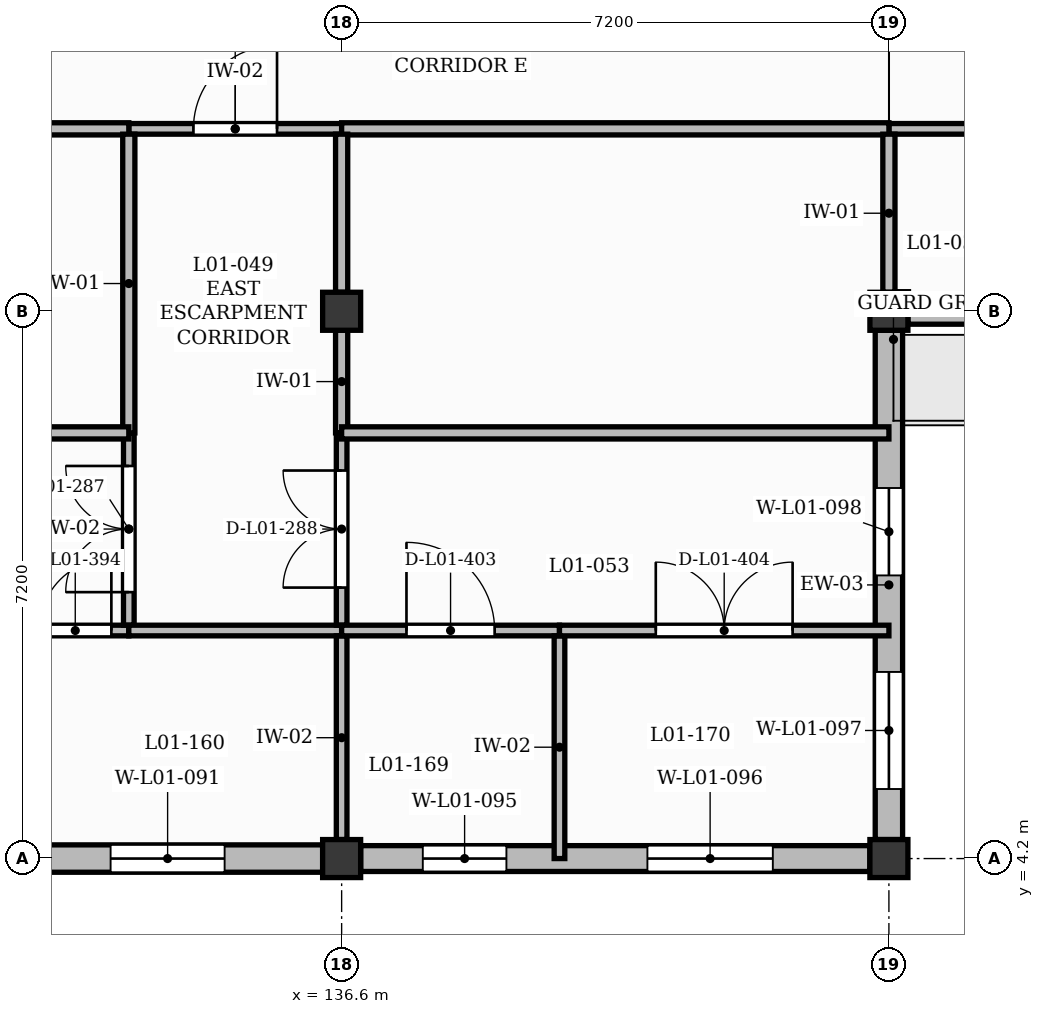
"""IFC4 building model, lengths in metres.
Left out: names, types, materials, properties, quantities, classifications, styles, units other than length and angle.
Written with IfcOpenShell. Run it as: python <this file> out.ifc"""

import sys

from ifc_helpers import new_model, si_unit, direction, frame, frame_2d, origin, origin_2d, place, context, subcontext, project, spatial, rectangle, extrude, element, fill, save


model = new_model("IFC4")
c1 = context("Model", 3, precision=1e-05, world=origin(), true_north=direction((0.0, 1.0)))
c2 = subcontext(c1, "Body", "Model", "MODEL_VIEW")
j1 = project(units=[si_unit("LENGTHUNIT", "METRE"), si_unit("PLANEANGLEUNIT", "RADIAN")], contexts=[c1])
p1 = place(None, origin())
s1 = spatial("IfcSite", under=j1, at=p1, CompositionType="ELEMENT")
p2 = place(p1, origin())
s2 = spatial("IfcBuilding", under=s1, at=p2, CompositionType="ELEMENT")
p3 = place(p2, frame((0.0, 0.0, 4.5)))
s3 = spatial("IfcBuildingStorey", under=s2, at=p3, CompositionType="ELEMENT", Elevation=4.5)
for number, where, z_axis, x_axis in (
    (1, (136.6, 4.2, 0.0), (0.0, 0.0, 1.0), (1.0, 0.0, 0.0)),
    (2, (136.6, 11.4, 0.0), (0.0, 0.0, 1.0), (1.0, 0.0, 0.0)),
    (3, (143.8, 4.2, 0.0), (0.0, 0.0, 1.0), (1.0, 0.0, 0.0)),
    (4, (143.8, 11.4, 0.0), (0.0, 0.0, 1.0), (1.0, 0.0, 0.0)),
):
    element("IfcColumn", number, at=place(p3, frame(where, z_axis=z_axis, x_axis=x_axis)), inside=s3, PredefinedType="COLUMN", context=c2, shape_type="SweptSolid", body=[
        extrude(rectangle(XDim=0.5, YDim=0.5, at=origin_2d()), origin(), (0.0, 0.0, 1.0), 4.22),
    ])
p4 = place(p3, frame((130.45, 4.2, 0.0), z_axis=(0.0, 0.0, 1.0), x_axis=(1.0, 0.0, 0.0)))
e5 = element("IfcWall", 5, at=p4, inside=s3, PredefinedType="SOLIDWALL", context=c2, shape_type="SweptSolid", body=[
    extrude(rectangle(XDim=5.9, YDim=0.36, at=frame_2d((2.95, 0.0))), origin(), (0.0, 0.0, 1.0), 3.52),
])
p5 = place(p4, frame((3.111, 0.0, 1.5)))
e6 = element("IfcOpeningElement", 6, at=p5, cuts=e5, PredefinedType="OPENING", context=c2, shape_type="SweptSolid", body=[
    extrude(rectangle(XDim=1.5, YDim=1.25, at=frame_2d((0.75, 0.625))), frame((0.0, 0.19, 0.0), z_axis=(0.0, -1.0, 0.0), x_axis=(1.0, 0.0, 0.0)), (0.0, 0.0, 1.0), 0.38),
])
p6 = place(p3, frame((136.85, 4.2, 0.0), z_axis=(0.0, 0.0, 1.0), x_axis=(1.0, 0.0, 0.0)))
e7 = element("IfcWall", 7, at=p6, inside=s3, PredefinedType="SOLIDWALL", context=c2, shape_type="SweptSolid", body=[
    extrude(rectangle(XDim=6.7, YDim=0.34, at=frame_2d((3.35, 0.0))), origin(), (0.0, 0.0, 1.0), 3.52),
])
p7 = place(p6, frame((0.818, 0.0, 1.0)))
e8 = element("IfcOpeningElement", 8, at=p7, cuts=e7, PredefinedType="OPENING", context=c2, shape_type="SweptSolid", body=[
    extrude(rectangle(XDim=1.1, YDim=1.8, at=frame_2d((0.55, 0.9))), frame((0.0, 0.18, 0.0), z_axis=(0.0, -1.0, 0.0), x_axis=(1.0, 0.0, 0.0)), (0.0, 0.0, 1.0), 0.36),
])
p8 = place(p6, frame((3.773, 0.0, 1.35)))
e9 = element("IfcOpeningElement", 9, at=p8, cuts=e7, PredefinedType="OPENING", context=c2, shape_type="SweptSolid", body=[
    extrude(rectangle(XDim=1.65, YDim=1.4, at=frame_2d((0.825, 0.7))), frame((0.0, 0.18, 0.0), z_axis=(0.0, -1.0, 0.0), x_axis=(1.0, 0.0, 0.0)), (0.0, 0.0, 1.0), 0.36),
])
p9 = place(p3, frame((143.8, 4.45, 0.0), z_axis=(0.0, 0.0, 1.0), x_axis=(0.0, 1.0, 0.0)))
e10 = element("IfcWall", 10, at=p9, inside=s3, PredefinedType="SOLIDWALL", context=c2, shape_type="SweptSolid", body=[
    extrude(rectangle(XDim=6.7, YDim=0.36, at=frame_2d((3.35, 0.0))), origin(), (0.0, 0.0, 1.0), 3.52),
])
p10 = place(p9, frame((0.665, 0.0, 1.05)))
e11 = element("IfcOpeningElement", 11, at=p10, cuts=e10, PredefinedType="OPENING", context=c2, shape_type="SweptSolid", body=[
    extrude(rectangle(XDim=1.54, YDim=1.65, at=frame_2d((0.77, 0.825))), frame((0.0, 0.19, 0.0), z_axis=(0.0, -1.0, 0.0), x_axis=(1.0, 0.0, 0.0)), (0.0, 0.0, 1.0), 0.38),
])
p11 = place(p9, frame((3.475, 0.0, 1.5)))
e12 = element("IfcOpeningElement", 12, at=p11, cuts=e10, PredefinedType="OPENING", context=c2, shape_type="SweptSolid", body=[
    extrude(rectangle(XDim=1.15, YDim=1.25, at=frame_2d((0.575, 0.625))), frame((0.0, 0.19, 0.0), z_axis=(0.0, -1.0, 0.0), x_axis=(1.0, 0.0, 0.0)), (0.0, 0.0, 1.0), 0.38),
])
p12 = place(p3, frame((144.05, 11.4, 0.0), z_axis=(0.0, 0.0, 1.0), x_axis=(1.0, 0.0, 0.0)))
e13 = element("IfcWall", 13, at=p12, inside=s3, PredefinedType="SOLIDWALL", context=c2, shape_type="SweptSolid", body=[
    extrude(rectangle(XDim=6.77, YDim=0.34, at=frame_2d((3.385, 0.0))), origin(), (0.0, 0.0, 1.0), 3.76),
])
p13 = place(p12, frame((1.75, 0.0, 0.0)))
e14 = element("IfcOpeningElement", 14, at=p13, cuts=e13, PredefinedType="OPENING", context=c2, shape_type="SweptSolid", body=[
    extrude(rectangle(XDim=1.18, YDim=2.2, at=frame_2d((0.59, 1.1))), frame((0.0, 0.18, 0.0), z_axis=(0.0, -1.0, 0.0), x_axis=(1.0, 0.0, 0.0)), (0.0, 0.0, 1.0), 0.36),
])
p14 = place(p12, frame((4.4, 0.0, 1.05)))
e15 = element("IfcOpeningElement", 15, at=p14, cuts=e13, PredefinedType="OPENING", context=c2, shape_type="SweptSolid", body=[
    extrude(rectangle(XDim=1.4, YDim=1.65, at=frame_2d((0.7, 0.825))), frame((0.0, 0.18, 0.0), z_axis=(0.0, -1.0, 0.0), x_axis=(1.0, 0.0, 0.0)), (0.0, 0.0, 1.0), 0.36),
])
p15 = place(p3, frame((132.391, 7.2, 0.0), z_axis=(0.0, 0.0, 1.0), x_axis=(1.0, 0.0, 0.0)))
e16 = element("IfcWall", 16, at=p15, inside=s3, PredefinedType="PARTITIONING", context=c2, shape_type="SweptSolid", body=[
    extrude(rectangle(XDim=1.409, YDim=0.14, at=frame_2d((0.705, 0.0))), origin(), (0.0, 0.0, 1.0), 4.18),
])
p16 = place(p15, frame((0.229, 0.0, 0.0)))
e17 = element("IfcOpeningElement", 17, at=p16, cuts=e16, PredefinedType="OPENING", context=c2, shape_type="SweptSolid", body=[
    extrude(rectangle(XDim=0.95, YDim=2.1, at=frame_2d((0.475, 1.05))), frame((0.0, 0.08, 0.0), z_axis=(0.0, -1.0, 0.0), x_axis=(1.0, 0.0, 0.0)), (0.0, 0.0, 1.0), 0.16),
])
p17 = place(p3, frame((133.8, 7.27, 0.0), z_axis=(0.0, 0.0, 1.0), x_axis=(0.0, 1.0, 0.0)))
e18 = element("IfcWall", 18, at=p17, inside=s3, PredefinedType="PARTITIONING", context=c2, shape_type="SweptSolid", body=[
    extrude(rectangle(XDim=2.53, YDim=0.14, at=frame_2d((1.265, 0.0))), origin(), (0.0, 0.0, 1.0), 4.18),
])
p18 = place(p17, frame((0.435, 0.0, 0.0)))
e19 = element("IfcOpeningElement", 19, at=p18, cuts=e18, PredefinedType="OPENING", context=c2, shape_type="SweptSolid", body=[
    extrude(rectangle(XDim=1.66, YDim=2.3, at=frame_2d((0.83, 1.15))), frame((0.0, 0.08, 0.0), z_axis=(0.0, -1.0, 0.0), x_axis=(1.0, 0.0, 0.0)), (0.0, 0.0, 1.0), 0.16),
])
p19 = place(p3, frame((133.8, 7.2, 0.0), z_axis=(0.0, 0.0, 1.0), x_axis=(1.0, 0.0, 0.0)))
e20 = element("IfcWall", 20, at=p19, inside=s3, PredefinedType="PARTITIONING", context=c2, shape_type="SweptSolid", body=[
    extrude(rectangle(XDim=2.8, YDim=0.14, at=frame_2d((1.4, 0.0))), origin(), (0.0, 0.0, 1.0), 4.18),
])
p20 = place(p3, frame((133.8, 13.8, 0.0), z_axis=(0.0, 0.0, 1.0), x_axis=(1.0, 0.0, 0.0)))
e21 = element("IfcWall", 21, at=p20, inside=s3, PredefinedType="PARTITIONING", context=c2, shape_type="SweptSolid", body=[
    extrude(rectangle(XDim=2.8, YDim=0.14, at=frame_2d((1.4, 0.0))), origin(), (0.0, 0.0, 1.0), 4.18),
])
p21 = place(p20, frame((0.85, 0.0, 0.0)))
e22 = element("IfcOpeningElement", 22, at=p21, cuts=e21, PredefinedType="OPENING", context=c2, shape_type="SweptSolid", body=[
    extrude(rectangle(XDim=1.1, YDim=2.1, at=frame_2d((0.55, 1.05))), frame((0.0, 0.08, 0.0), z_axis=(0.0, -1.0, 0.0), x_axis=(1.0, 0.0, 0.0)), (0.0, 0.0, 1.0), 0.16),
])
p22 = place(p3, frame((136.6, 4.45, 0.0), z_axis=(0.0, 0.0, 1.0), x_axis=(0.0, 1.0, 0.0)))
e23 = element("IfcWall", 23, at=p22, inside=s3, PredefinedType="PARTITIONING", context=c2, shape_type="SweptSolid", body=[
    extrude(rectangle(XDim=2.68, YDim=0.14, at=frame_2d((1.34, 0.0))), origin(), (0.0, 0.0, 1.0), 3.52),
])
p23 = place(p3, frame((136.6, 7.27, 0.0), z_axis=(0.0, 0.0, 1.0), x_axis=(0.0, 1.0, 0.0)))
e24 = element("IfcWall", 24, at=p23, inside=s3, PredefinedType="PARTITIONING", context=c2, shape_type="SweptSolid", body=[
    extrude(rectangle(XDim=2.53, YDim=0.14, at=frame_2d((1.265, 0.0))), origin(), (0.0, 0.0, 1.0), 3.52),
])
p24 = place(p23, frame((0.495, 0.0, 0.0)))
e25 = element("IfcOpeningElement", 25, at=p24, cuts=e24, PredefinedType="OPENING", context=c2, shape_type="SweptSolid", body=[
    extrude(rectangle(XDim=1.54, YDim=2.25, at=frame_2d((0.77, 1.125))), frame((0.0, 0.08, 0.0), z_axis=(0.0, -1.0, 0.0), x_axis=(1.0, 0.0, 0.0)), (0.0, 0.0, 1.0), 0.16),
])
p25 = place(p3, frame((136.6, 7.2, 0.0), z_axis=(0.0, 0.0, 1.0), x_axis=(1.0, 0.0, 0.0)))
e26 = element("IfcWall", 26, at=p25, inside=s3, PredefinedType="PARTITIONING", context=c2, shape_type="SweptSolid", body=[
    extrude(rectangle(XDim=2.866, YDim=0.14, at=frame_2d((1.433, 0.0))), origin(), (0.0, 0.0, 1.0), 4.18),
])
p26 = place(p25, frame((0.853, 0.0, 0.0)))
e27 = element("IfcOpeningElement", 27, at=p26, cuts=e26, PredefinedType="OPENING", context=c2, shape_type="SweptSolid", body=[
    extrude(rectangle(XDim=1.16, YDim=2.1, at=frame_2d((0.58, 1.05))), frame((0.0, 0.08, 0.0), z_axis=(0.0, -1.0, 0.0), x_axis=(1.0, 0.0, 0.0)), (0.0, 0.0, 1.0), 0.16),
])
p27 = place(p3, frame((139.466, 4.2, 0.0), z_axis=(0.0, 0.0, 1.0), x_axis=(0.0, 1.0, 0.0)))
e28 = element("IfcWall", 28, at=p27, inside=s3, PredefinedType="PARTITIONING", context=c2, shape_type="SweptSolid", body=[
    extrude(rectangle(XDim=2.93, YDim=0.14, at=frame_2d((1.465, 0.0))), origin(), (0.0, 0.0, 1.0), 4.18),
])
p28 = place(p3, frame((139.466, 7.2, 0.0), z_axis=(0.0, 0.0, 1.0), x_axis=(1.0, 0.0, 0.0)))
e29 = element("IfcWall", 29, at=p28, inside=s3, PredefinedType="PARTITIONING", context=c2, shape_type="SweptSolid", body=[
    extrude(rectangle(XDim=4.334, YDim=0.14, at=frame_2d((2.167, 0.0))), origin(), (0.0, 0.0, 1.0), 4.18),
])
p29 = place(p28, frame((1.267, 0.0, 0.0)))
e30 = element("IfcOpeningElement", 30, at=p29, cuts=e29, PredefinedType="OPENING", context=c2, shape_type="SweptSolid", body=[
    extrude(rectangle(XDim=1.8, YDim=2.3, at=frame_2d((0.9, 1.15))), frame((0.0, 0.08, 0.0), z_axis=(0.0, -1.0, 0.0), x_axis=(1.0, 0.0, 0.0)), (0.0, 0.0, 1.0), 0.16),
])
p30 = place(p3, frame((143.8, 13.8, 0.0), z_axis=(0.0, 0.0, 1.0), x_axis=(1.0, 0.0, 0.0)))
e31 = element("IfcWall", 31, at=p30, inside=s3, PredefinedType="PARTITIONING", context=c2, shape_type="SweptSolid", body=[
    extrude(rectangle(XDim=3.8, YDim=0.14, at=frame_2d((1.9, 0.0))), origin(), (0.0, 0.0, 1.0), 4.18),
])
p31 = place(p30, frame((1.44, 0.0, 0.0)))
e32 = element("IfcOpeningElement", 32, at=p31, cuts=e31, PredefinedType="OPENING", context=c2, shape_type="SweptSolid", body=[
    extrude(rectangle(XDim=0.92, YDim=2.1, at=frame_2d((0.46, 1.05))), frame((0.0, 0.08, 0.0), z_axis=(0.0, -1.0, 0.0), x_axis=(1.0, 0.0, 0.0)), (0.0, 0.0, 1.0), 0.16),
])
p32 = place(p3, frame((129.405, 13.8, 0.0), z_axis=(0.0, 0.0, 1.0), x_axis=(1.0, 0.0, 0.0)))
e33 = element("IfcWall", 33, at=p32, inside=s3, PredefinedType="PARTITIONING", context=c2, shape_type="SweptSolid", body=[
    extrude(rectangle(XDim=4.395, YDim=0.16, at=frame_2d((2.198, 0.0))), origin(), (0.0, 0.0, 1.0), 4.18),
])
p33 = place(p3, frame((136.6, 13.8, 0.0), z_axis=(0.0, 0.0, 1.0), x_axis=(1.0, 0.0, 0.0)))
e34 = element("IfcWall", 34, at=p33, inside=s3, PredefinedType="PARTITIONING", context=c2, shape_type="SweptSolid", body=[
    extrude(rectangle(XDim=7.2, YDim=0.16, at=frame_2d((3.6, 0.0))), origin(), (0.0, 0.0, 1.0), 4.18),
])
p34 = place(p3, frame((143.8, 11.65, 0.0), z_axis=(0.0, 0.0, 1.0), x_axis=(0.0, 1.0, 0.0)))
e35 = element("IfcWall", 35, at=p34, inside=s3, PredefinedType="PARTITIONING", context=c2, shape_type="SweptSolid", body=[
    extrude(rectangle(XDim=2.08, YDim=0.16, at=frame_2d((1.04, 0.0))), origin(), (0.0, 0.0, 1.0), 3.52),
])
p35 = place(p3, frame((136.6, 9.8, 0.0), z_axis=(0.0, 0.0, 1.0), x_axis=(0.0, 1.0, 0.0)))
e36 = element("IfcWall", 36, at=p35, inside=s3, PredefinedType="PARTITIONING", context=c2, shape_type="SweptSolid", body=[
    extrude(rectangle(XDim=1.35, YDim=0.16, at=frame_2d((0.675, 0.0))), origin(), (0.0, 0.0, 1.0), 3.52),
])
p36 = place(p3, frame((136.6, 11.65, 0.0), z_axis=(0.0, 0.0, 1.0), x_axis=(0.0, 1.0, 0.0)))
e37 = element("IfcWall", 37, at=p36, inside=s3, PredefinedType="PARTITIONING", context=c2, shape_type="SweptSolid", body=[
    extrude(rectangle(XDim=2.08, YDim=0.16, at=frame_2d((1.04, 0.0))), origin(), (0.0, 0.0, 1.0), 3.52),
])
p37 = place(p3, frame((133.8, 9.8, 0.0), z_axis=(0.0, 0.0, 1.0), x_axis=(0.0, 1.0, 0.0)))
e38 = element("IfcWall", 38, at=p37, inside=s3, PredefinedType="PARTITIONING", context=c2, shape_type="SweptSolid", body=[
    extrude(rectangle(XDim=3.93, YDim=0.16, at=frame_2d((1.965, 0.0))), origin(), (0.0, 0.0, 1.0), 4.18),
])
p38 = place(p3, frame((133.8, 9.8, 0.0), z_axis=(0.0, 0.0, 1.0), x_axis=(-1.0, 0.0, 0.0)))
e39 = element("IfcWall", 39, at=p38, inside=s3, PredefinedType="PARTITIONING", context=c2, shape_type="SweptSolid", body=[
    extrude(rectangle(XDim=4.395, YDim=0.16, at=frame_2d((2.198, 0.0))), origin(), (0.0, 0.0, 1.0), 4.18),
])
p39 = place(p3, frame((143.8, 9.8, 0.0), z_axis=(0.0, 0.0, 1.0), x_axis=(-1.0, 0.0, 0.0)))
e40 = element("IfcWall", 40, at=p39, inside=s3, PredefinedType="PARTITIONING", context=c2, shape_type="SweptSolid", body=[
    extrude(rectangle(XDim=7.2, YDim=0.16, at=frame_2d((3.6, 0.0))), origin(), (0.0, 0.0, 1.0), 4.18),
])
p40 = place(p5, origin())
e41 = element("IfcWindow", 41, at=p40, inside=s3, PartitioningType="DOUBLE_PANEL_VERTICAL", PredefinedType="WINDOW", context=c2, shape_type="SweptSolid", body=[
    extrude(rectangle(XDim=1.5, YDim=1.25, at=frame_2d((0.75, 0.625))), frame((0.0, 0.03, 0.0), z_axis=(0.0, -1.0, 0.0), x_axis=(1.0, 0.0, 0.0)), (0.0, 0.0, 1.0), 0.06),
])
fill(e6, e41)
p41 = place(p7, origin())
e42 = element("IfcWindow", 42, at=p41, inside=s3, PartitioningType="SINGLE_PANEL", PredefinedType="WINDOW", context=c2, shape_type="SweptSolid", body=[
    extrude(rectangle(XDim=1.1, YDim=1.8, at=frame_2d((0.55, 0.9))), frame((0.0, 0.03, 0.0), z_axis=(0.0, -1.0, 0.0), x_axis=(1.0, 0.0, 0.0)), (0.0, 0.0, 1.0), 0.06),
])
fill(e8, e42)
p42 = place(p8, origin())
e43 = element("IfcWindow", 43, at=p42, inside=s3, PartitioningType="DOUBLE_PANEL_VERTICAL", PredefinedType="WINDOW", context=c2, shape_type="SweptSolid", body=[
    extrude(rectangle(XDim=1.65, YDim=1.4, at=frame_2d((0.825, 0.7))), frame((0.0, 0.03, 0.0), z_axis=(0.0, -1.0, 0.0), x_axis=(1.0, 0.0, 0.0)), (0.0, 0.0, 1.0), 0.06),
])
fill(e9, e43)
p43 = place(p10, origin())
e44 = element("IfcWindow", 44, at=p43, inside=s3, PartitioningType="DOUBLE_PANEL_VERTICAL", PredefinedType="WINDOW", context=c2, shape_type="SweptSolid", body=[
    extrude(rectangle(XDim=1.54, YDim=1.65, at=frame_2d((0.77, 0.825))), frame((0.0, 0.03, 0.0), z_axis=(0.0, -1.0, 0.0), x_axis=(1.0, 0.0, 0.0)), (0.0, 0.0, 1.0), 0.06),
])
fill(e11, e44)
p44 = place(p11, origin())
e45 = element("IfcWindow", 45, at=p44, inside=s3, PartitioningType="SINGLE_PANEL", PredefinedType="WINDOW", context=c2, shape_type="SweptSolid", body=[
    extrude(rectangle(XDim=1.15, YDim=1.25, at=frame_2d((0.575, 0.625))), frame((0.0, 0.03, 0.0), z_axis=(0.0, -1.0, 0.0), x_axis=(1.0, 0.0, 0.0)), (0.0, 0.0, 1.0), 0.06),
])
fill(e12, e45)
p45 = place(p21, origin())
e46 = element("IfcDoor", 46, at=p45, inside=s3, OperationType="SINGLE_SWING_RIGHT", PredefinedType="DOOR", context=c2, shape_type="SweptSolid", body=[
    extrude(rectangle(XDim=1.1, YDim=2.1, at=frame_2d((0.55, 1.05))), frame((0.0, 0.025, 0.0), z_axis=(0.0, -1.0, 0.0), x_axis=(1.0, 0.0, 0.0)), (0.0, 0.0, 1.0), 0.05),
])
fill(e22, e46)
p46 = place(p18, origin())
e47 = element("IfcDoor", 47, at=p46, inside=s3, OperationType="DOUBLE_DOOR_SINGLE_SWING", PredefinedType="DOOR", context=c2, shape_type="SweptSolid", body=[
    extrude(rectangle(XDim=1.66, YDim=2.3, at=frame_2d((0.83, 1.15))), frame((0.0, 0.025, 0.0), z_axis=(0.0, -1.0, 0.0), x_axis=(1.0, 0.0, 0.0)), (0.0, 0.0, 1.0), 0.05),
])
fill(e19, e47)
p47 = place(p24, origin())
e48 = element("IfcDoor", 48, at=p47, inside=s3, OperationType="DOUBLE_DOOR_SINGLE_SWING", PredefinedType="DOOR", context=c2, shape_type="SweptSolid", body=[
    extrude(rectangle(XDim=1.54, YDim=2.25, at=frame_2d((0.77, 1.125))), frame((0.0, 0.025, 0.0), z_axis=(0.0, -1.0, 0.0), x_axis=(1.0, 0.0, 0.0)), (0.0, 0.0, 1.0), 0.05),
])
fill(e25, e48)
p48 = place(p16, origin())
e49 = element("IfcDoor", 49, at=p48, inside=s3, OperationType="SINGLE_SWING_RIGHT", PredefinedType="DOOR", context=c2, shape_type="SweptSolid", body=[
    extrude(rectangle(XDim=0.95, YDim=2.1, at=frame_2d((0.475, 1.05))), frame((0.0, 0.025, 0.0), z_axis=(0.0, -1.0, 0.0), x_axis=(1.0, 0.0, 0.0)), (0.0, 0.0, 1.0), 0.05),
])
fill(e17, e49)
p49 = place(p26, origin())
e50 = element("IfcDoor", 50, at=p49, inside=s3, OperationType="SINGLE_SWING_LEFT", PredefinedType="DOOR", context=c2, shape_type="SweptSolid", body=[
    extrude(rectangle(XDim=1.16, YDim=2.1, at=frame_2d((0.58, 1.05))), frame((0.0, 0.025, 0.0), z_axis=(0.0, -1.0, 0.0), x_axis=(1.0, 0.0, 0.0)), (0.0, 0.0, 1.0), 0.05),
])
fill(e27, e50)
p50 = place(p29, origin())
e51 = element("IfcDoor", 51, at=p50, inside=s3, OperationType="DOUBLE_DOOR_SINGLE_SWING", PredefinedType="DOOR", context=c2, shape_type="SweptSolid", body=[
    extrude(rectangle(XDim=1.8, YDim=2.3, at=frame_2d((0.9, 1.15))), frame((0.0, 0.025, 0.0), z_axis=(0.0, -1.0, 0.0), x_axis=(1.0, 0.0, 0.0)), (0.0, 0.0, 1.0), 0.05),
])
fill(e30, e51)
save(model, sys.argv[1])
